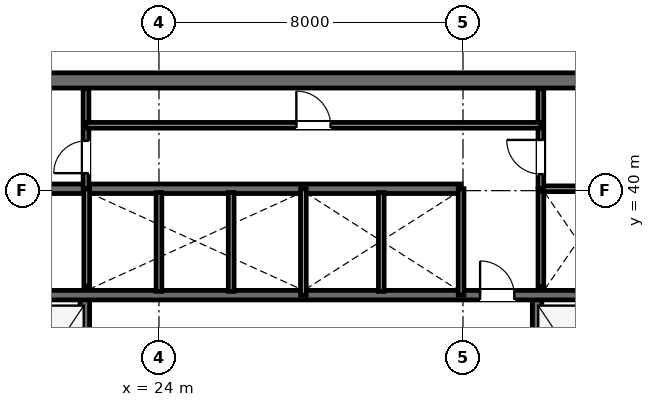
"""IFC4 building model, lengths in metres.
Left out: names, types, materials, properties, quantities, classifications, styles, units other than length and angle.
Written with IfcOpenShell. Run it as: python <this file> out.ifc"""

import sys

from ifc_helpers import new_model, si_unit, direction, frame, frame_2d, origin, place, context, subcontext, project, spatial, rectangle, extrude, element, fill, save


model = new_model("IFC4")
c1 = context("Model", 3, precision=1e-05, world=origin(), true_north=direction((0.0, 1.0)))
c2 = subcontext(c1, "Body", "Model", "MODEL_VIEW")
j1 = project(units=[si_unit("LENGTHUNIT", "METRE"), si_unit("PLANEANGLEUNIT", "RADIAN")], contexts=[c1])
p1 = place(None, origin())
s1 = spatial("IfcSite", under=j1, at=p1, CompositionType="ELEMENT")
p2 = place(p1, origin())
s2 = spatial("IfcBuilding", under=s1, at=p2, CompositionType="ELEMENT")
p3 = place(p2, frame((0.0, 0.0, 76.2)))
s3 = spatial("IfcBuildingStorey", under=s2, at=p3, CompositionType="ELEMENT", Elevation=76.2)
p4 = place(p3, frame((15.85, 42.9, 0.0), z_axis=(0.0, 0.0, 1.0), x_axis=(1.0, 0.0, 0.0)))
e1 = element("IfcWall", 1, at=p4, inside=s3, PredefinedType="SHEAR", context=c2, shape_type="SweptSolid", body=[
    extrude(rectangle(XDim=24.3, YDim=0.4, at=frame_2d((12.15, 0.0))), origin(), (0.0, 0.0, 1.0), 3.6),
])
for number, where, z_axis, x_axis in (
    (2, (22.05, 30.8, 0.0), (0.0, 0.0, 1.0), (0.0, 1.0, 0.0)),
    (3, (33.95, 30.8, 0.0), (0.0, 0.0, 1.0), (0.0, 1.0, 0.0)),
):
    element("IfcWall", number, at=place(p3, frame(where, z_axis=z_axis, x_axis=x_axis)), inside=s3, PredefinedType="SHEAR", context=c2, shape_type="SweptSolid", body=[
        extrude(rectangle(XDim=6.45, YDim=0.25, at=frame_2d((3.225, 0.0))), origin(), (0.0, 0.0, 1.0), 3.6),
    ])
p5 = place(p3, frame((19.9, 37.25, 0.0), z_axis=(0.0, 0.0, 1.0), x_axis=(1.0, 0.0, 0.0)))
e4 = element("IfcWall", 4, at=p5, inside=s3, PredefinedType="SHEAR", context=c2, shape_type="SweptSolid", body=[
    extrude(rectangle(XDim=16.2, YDim=0.25, at=frame_2d((8.1, 0.0))), origin(), (0.0, 0.0, 1.0), 3.6),
])
p6 = place(p5, frame((12.55, 0.0, 0.0)))
e5 = element("IfcOpeningElement", 5, at=p6, cuts=e4, PredefinedType="OPENING", context=c2, shape_type="SweptSolid", body=[
    extrude(rectangle(XDim=0.9, YDim=2.15, at=frame_2d((0.45, 1.075))), frame((0.0, 0.135, 0.0), z_axis=(0.0, -1.0, 0.0), x_axis=(1.0, 0.0, 0.0)), (0.0, 0.0, 1.0), 0.27),
])
p7 = place(p3, frame((19.9, 40.05, 0.0), z_axis=(0.0, 0.0, 1.0), x_axis=(1.0, 0.0, 0.0)))
e6 = element("IfcWall", 6, at=p7, inside=s3, PredefinedType="SHEAR", context=c2, shape_type="SweptSolid", body=[
    extrude(rectangle(XDim=12.05, YDim=0.25, at=frame_2d((6.025, 0.0))), origin(), (0.0, 0.0, 1.0), 3.6),
])
p8 = place(p3, frame((22.1, 37.49, 0.0), z_axis=(0.0, 0.0, 1.0), x_axis=(0.0, 1.0, 0.0)))
e7 = element("IfcWall", 7, at=p8, inside=s3, PredefinedType="PLUMBINGWALL", context=c2, shape_type="SweptSolid", body=[
    extrude(rectangle(XDim=2.56, YDim=0.15, at=frame_2d((1.28, 0.0))), origin(), (0.0, 0.0, 1.0), 3.24),
])
p9 = place(p3, frame((27.8, 37.25, 0.0), z_axis=(0.0, 0.0, 1.0), x_axis=(0.0, 1.0, 0.0)))
e8 = element("IfcWall", 8, at=p9, inside=s3, PredefinedType="PLUMBINGWALL", context=c2, shape_type="SweptSolid", body=[
    extrude(rectangle(XDim=2.8, YDim=0.15, at=frame_2d((1.4, 0.0))), origin(), (0.0, 0.0, 1.0), 3.24),
])
for number, where, z_axis, x_axis in (
    (9, (24.0, 37.35, 0.0), (0.0, 0.0, 1.0), (0.0, 1.0, 0.0)),
    (10, (25.9, 37.35, 0.0), (0.0, 0.0, 1.0), (0.0, 1.0, 0.0)),
):
    element("IfcWall", number, at=place(p3, frame(where, z_axis=z_axis, x_axis=x_axis)), inside=s3, PredefinedType="PLUMBINGWALL", context=c2, shape_type="SweptSolid", body=[
        extrude(rectangle(XDim=2.6, YDim=0.15, at=frame_2d((1.3, 0.0))), origin(), (0.0, 0.0, 1.0), 3.24),
    ])
p10 = place(p3, frame((31.95, 37.25, 0.0), z_axis=(0.0, 0.0, 1.0), x_axis=(0.0, 1.0, 0.0)))
e11 = element("IfcWall", 11, at=p10, inside=s3, PredefinedType="PLUMBINGWALL", context=c2, shape_type="SweptSolid", body=[
    extrude(rectangle(XDim=2.8, YDim=0.15, at=frame_2d((1.4, 0.0))), origin(), (0.0, 0.0, 1.0), 3.24),
])
p11 = place(p3, frame((29.85, 37.35, 0.0), z_axis=(0.0, 0.0, 1.0), x_axis=(0.0, 1.0, 0.0)))
e12 = element("IfcWall", 12, at=p11, inside=s3, PredefinedType="PLUMBINGWALL", context=c2, shape_type="SweptSolid", body=[
    extrude(rectangle(XDim=2.6, YDim=0.15, at=frame_2d((1.3, 0.0))), origin(), (0.0, 0.0, 1.0), 3.24),
])
p12 = place(p3, frame((34.05, 37.473, 0.0), z_axis=(0.0, 0.0, 1.0), x_axis=(0.0, 1.0, 0.0)))
e13 = element("IfcWall", 13, at=p12, inside=s3, PredefinedType="PLUMBINGWALL", context=c2, shape_type="SweptSolid", body=[
    extrude(rectangle(XDim=2.577, YDim=0.15, at=frame_2d((1.288, 0.0))), origin(), (0.0, 0.0, 1.0), 3.24),
])
p13 = place(p3, frame((34.05, 40.05, 0.0), z_axis=(0.0, 0.0, 1.0), x_axis=(1.0, 0.0, 0.0)))
e14 = element("IfcWall", 14, at=p13, inside=s3, PredefinedType="PARTITIONING", context=c2, shape_type="SweptSolid", body=[
    extrude(rectangle(XDim=2.05, YDim=0.15, at=frame_2d((1.025, 0.0))), origin(), (0.0, 0.0, 1.0), 3.24),
])
p14 = place(p3, frame((34.05, 40.05, 0.0), z_axis=(0.0, 0.0, 1.0), x_axis=(0.0, 1.0, 0.0)))
e15 = element("IfcWall", 15, at=p14, inside=s3, PredefinedType="PARTITIONING", context=c2, shape_type="SweptSolid", body=[
    extrude(rectangle(XDim=2.63, YDim=0.15, at=frame_2d((1.315, 0.0))), origin(), (0.0, 0.0, 1.0), 3.24),
])
p15 = place(p14, frame((0.385, 0.0, 0.0)))
e16 = element("IfcOpeningElement", 16, at=p15, cuts=e15, PredefinedType="OPENING", context=c2, shape_type="SweptSolid", body=[
    extrude(rectangle(XDim=0.9, YDim=2.15, at=frame_2d((0.45, 1.075))), frame((0.0, 0.085, 0.0), z_axis=(0.0, -1.0, 0.0), x_axis=(1.0, 0.0, 0.0)), (0.0, 0.0, 1.0), 0.17),
])
p16 = place(p3, frame((22.08, 40.05, 0.0), z_axis=(0.0, 0.0, 1.0), x_axis=(0.0, 1.0, 0.0)))
e17 = element("IfcWall", 17, at=p16, inside=s3, PredefinedType="PARTITIONING", context=c2, shape_type="SweptSolid", body=[
    extrude(rectangle(XDim=2.63, YDim=0.15, at=frame_2d((1.315, 0.0))), origin(), (0.0, 0.0, 1.0), 3.24),
])
p17 = place(p16, frame((0.41, 0.0, 0.0)))
e18 = element("IfcOpeningElement", 18, at=p17, cuts=e17, PredefinedType="OPENING", context=c2, shape_type="SweptSolid", body=[
    extrude(rectangle(XDim=0.85, YDim=2.15, at=frame_2d((0.425, 1.075))), frame((0.0, 0.085, 0.0), z_axis=(0.0, -1.0, 0.0), x_axis=(1.0, 0.0, 0.0)), (0.0, 0.0, 1.0), 0.17),
])
p18 = place(p3, frame((22.08, 41.72, 0.0), z_axis=(0.0, 0.0, 1.0), x_axis=(1.0, 0.0, 0.0)))
e19 = element("IfcWall", 19, at=p18, inside=s3, PredefinedType="PARTITIONING", context=c2, shape_type="SweptSolid", body=[
    extrude(rectangle(XDim=11.97, YDim=0.15, at=frame_2d((5.985, 0.0))), origin(), (0.0, 0.0, 1.0), 3.24),
])
p19 = place(p18, frame((5.535, 0.0, 0.0)))
e20 = element("IfcOpeningElement", 20, at=p19, cuts=e19, PredefinedType="OPENING", context=c2, shape_type="SweptSolid", body=[
    extrude(rectangle(XDim=0.9, YDim=2.15, at=frame_2d((0.45, 1.075))), frame((0.0, 0.085, 0.0), z_axis=(0.0, -1.0, 0.0), x_axis=(1.0, 0.0, 0.0)), (0.0, 0.0, 1.0), 0.17),
])
p20 = place(p6, origin())
e21 = element("IfcDoor", 21, at=p20, inside=s3, OperationType="SINGLE_SWING_LEFT", PredefinedType="DOOR", context=c2, shape_type="SweptSolid", body=[
    extrude(rectangle(XDim=0.9, YDim=2.15, at=frame_2d((0.45, 1.075))), frame((0.0, 0.025, 0.0), z_axis=(0.0, -1.0, 0.0), x_axis=(1.0, 0.0, 0.0)), (0.0, 0.0, 1.0), 0.05),
])
fill(e5, e21)
p21 = place(p15, origin())
e22 = element("IfcDoor", 22, at=p21, inside=s3, OperationType="SINGLE_SWING_RIGHT", PredefinedType="DOOR", context=c2, shape_type="SweptSolid", body=[
    extrude(rectangle(XDim=0.9, YDim=2.15, at=frame_2d((0.45, 1.075))), frame((0.0, 0.025, 0.0), z_axis=(0.0, -1.0, 0.0), x_axis=(1.0, 0.0, 0.0)), (0.0, 0.0, 1.0), 0.05),
])
fill(e16, e22)
p22 = place(p17, origin())
e23 = element("IfcDoor", 23, at=p22, inside=s3, OperationType="SINGLE_SWING_LEFT", PredefinedType="DOOR", context=c2, shape_type="SweptSolid", body=[
    extrude(rectangle(XDim=0.85, YDim=2.15, at=frame_2d((0.425, 1.075))), frame((0.0, 0.025, 0.0), z_axis=(0.0, -1.0, 0.0), x_axis=(1.0, 0.0, 0.0)), (0.0, 0.0, 1.0), 0.05),
])
fill(e18, e23)
p23 = place(p19, origin())
e24 = element("IfcDoor", 24, at=p23, inside=s3, OperationType="SINGLE_SWING_LEFT", PredefinedType="DOOR", context=c2, shape_type="SweptSolid", body=[
    extrude(rectangle(XDim=0.9, YDim=2.15, at=frame_2d((0.45, 1.075))), frame((0.0, 0.025, 0.0), z_axis=(0.0, -1.0, 0.0), x_axis=(1.0, 0.0, 0.0)), (0.0, 0.0, 1.0), 0.05),
])
fill(e20, e24)
save(model, sys.argv[1])
